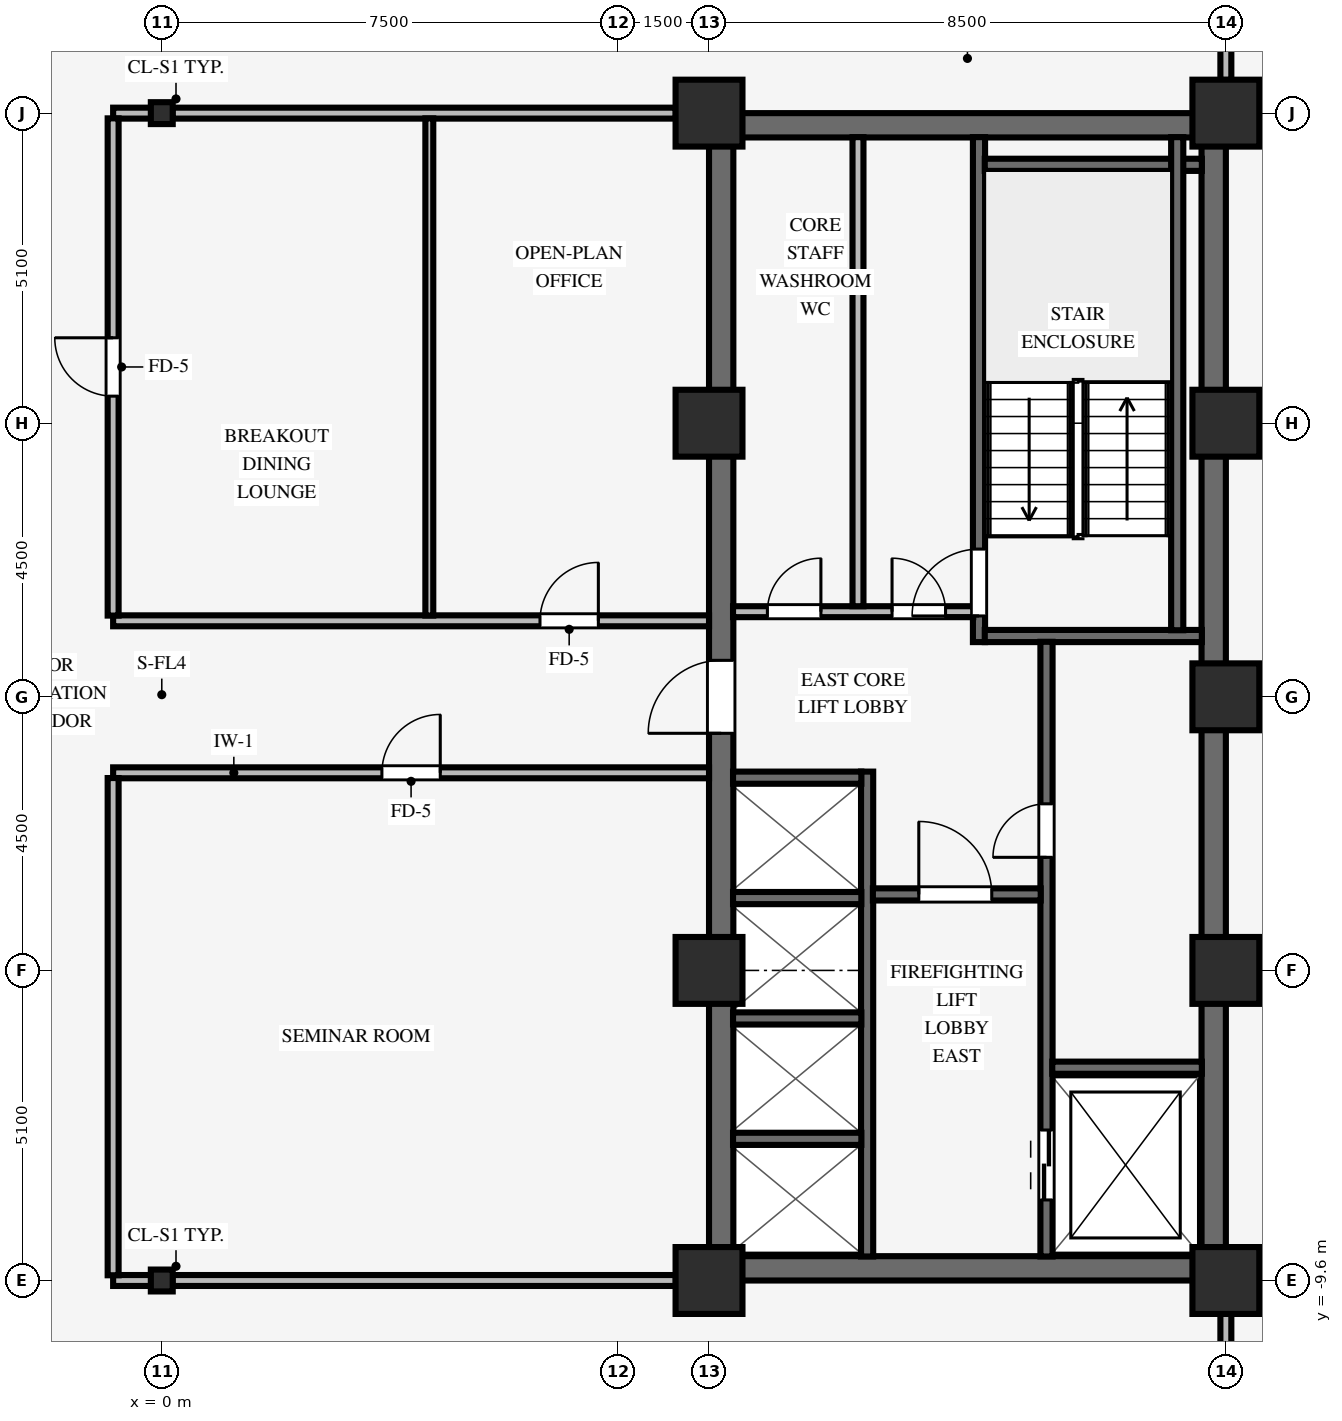
"""IFC4 building model, lengths in metres.
Left out: names, types, materials, properties, quantities, classifications, styles, units other than length and angle.
Written with IfcOpenShell. Run it as: python <this file> out.ifc"""

import sys

from ifc_helpers import new_model, si_unit, direction, frame, frame_2d, origin, origin_2d, place, context, subcontext, project, spatial, rectangle, i_section, extrude, source, transform, mapped, element, fill, save


model = new_model("IFC4")
c1 = context("Model", 3, precision=1e-05, world=origin(), true_north=direction((0.0, 1.0)))
c2 = subcontext(c1, "Body", "Model", "MODEL_VIEW")
j1 = project(units=[si_unit("LENGTHUNIT", "METRE"), si_unit("PLANEANGLEUNIT", "RADIAN")], contexts=[c1])
p1 = place(None, origin())
s1 = spatial("IfcSite", under=j1, at=p1, CompositionType="ELEMENT")
p2 = place(p1, origin())
s2 = spatial("IfcBuilding", under=s1, at=p2, CompositionType="ELEMENT")
p3 = place(p2, frame((0.0, 0.0, 98.3)))
s3 = spatial("IfcBuildingStorey", under=s2, at=p3, CompositionType="ELEMENT", Elevation=98.3)
for number, where, z_axis, x_axis in (
    (1, (9.0, -9.4, 0.0), (0.0, 0.0, 1.0), (1.0, 0.0, 0.0)),
    (2, (9.0, 9.4, 0.0), (0.0, 0.0, 1.0), (1.0, 0.0, 0.0)),
):
    element("IfcWall", number, at=place(p3, frame(where, z_axis=z_axis, x_axis=x_axis)), inside=s3, PredefinedType="SHEAR", context=c2, shape_type="SweptSolid", body=[
        extrude(rectangle(XDim=8.5, YDim=0.4, at=frame_2d((4.25, 0.0))), origin(), (0.0, 0.0, 1.0), 3.37),
    ])
p4 = place(p3, frame((9.2, -9.205, 0.0), z_axis=(0.0, 0.0, 1.0), x_axis=(0.0, 1.0, 0.0)))
e3 = element("IfcWall", 3, at=p4, inside=s3, PredefinedType="SHEAR", context=c2, shape_type="SweptSolid", body=[
    extrude(rectangle(XDim=18.41, YDim=0.4, at=frame_2d((9.205, 0.0))), origin(), (0.0, 0.0, 1.0), 3.37),
])
p5 = place(p4, frame((8.605, 0.0, 0.0)))
e4 = element("IfcOpeningElement", 4, at=p5, cuts=e3, PredefinedType="OPENING", context=c2, shape_type="SweptSolid", body=[
    extrude(rectangle(XDim=1.2, YDim=2.15, at=frame_2d((0.6, 1.075))), frame((0.0, 0.21, 0.0), z_axis=(0.0, -1.0, 0.0), x_axis=(1.0, 0.0, 0.0)), (0.0, 0.0, 1.0), 0.42),
])
p6 = place(p3, frame((17.3, -9.205, 0.0), z_axis=(0.0, 0.0, 1.0), x_axis=(0.0, 1.0, 0.0)))
e5 = element("IfcWall", 5, at=p6, inside=s3, PredefinedType="SHEAR", context=c2, shape_type="SweptSolid", body=[
    extrude(rectangle(XDim=18.41, YDim=0.4, at=frame_2d((9.205, 0.0))), origin(), (0.0, 0.0, 1.0), 3.37),
])
for number, where, z_axis, x_axis in (
    (6, (9.0, -9.6, 0.0), (0.0, 0.0, 1.0), (1.0, 0.0, 0.0)),
    (7, (9.0, -4.5, 0.0), (0.0, 0.0, 1.0), (1.0, 0.0, 0.0)),
    (8, (9.0, 4.5, 0.0), (0.0, 0.0, 1.0), (1.0, 0.0, 0.0)),
    (9, (9.0, 9.6, 0.0), (0.0, 0.0, 1.0), (1.0, 0.0, 0.0)),
    (10, (17.5, -9.6, 0.0), (0.0, 0.0, 1.0), (1.0, 0.0, 0.0)),
    (11, (17.5, -4.5, 0.0), (0.0, 0.0, 1.0), (1.0, 0.0, 0.0)),
    (12, (17.5, 4.5, 0.0), (0.0, 0.0, 1.0), (1.0, 0.0, 0.0)),
    (13, (17.5, 9.6, 0.0), (0.0, 0.0, 1.0), (1.0, 0.0, 0.0)),
    (14, (17.5, 0.0, 0.0), (0.0, 0.0, 1.0), (1.0, 0.0, 0.0)),
):
    element("IfcColumn", number, at=place(p3, frame(where, z_axis=z_axis, x_axis=x_axis)), inside=s3, PredefinedType="COLUMN", context=c2, shape_type="SweptSolid", body=[
        extrude(rectangle(XDim=1.1, YDim=1.1, at=origin_2d()), origin(), (0.0, 0.0, 1.0), 3.37),
    ])
for number, where, z_axis, x_axis in (
    (15, (0.0, -9.6, 0.0), (0.0, 0.0, 1.0), (1.0, 0.0, 0.0)),
    (16, (0.0, 9.6, 0.0), (0.0, 0.0, 1.0), (1.0, 0.0, 0.0)),
):
    element("IfcColumn", number, at=place(p3, frame(where, z_axis=z_axis, x_axis=x_axis)), inside=s3, PredefinedType="COLUMN", context=c2, shape_type="SweptSolid", body=[
        extrude(i_section(OverallWidth=0.36, OverallDepth=0.36, WebThickness=0.021, FlangeThickness=0.021, FilletRadius=0.018, at=origin_2d()), origin(), (0.0, 0.0, 1.0), 3.37),
    ])
p7 = place(p3, frame((13.44, 0.9, 0.0), z_axis=(0.0, 0.0, 1.0), x_axis=(0.0, 1.0, 0.0)))
e17 = element("IfcWall", 17, at=p7, inside=s3, PredefinedType="SHEAR", context=c2, shape_type="SweptSolid", body=[
    extrude(rectangle(XDim=8.305, YDim=0.2, at=frame_2d((4.153, 0.0))), origin(), (0.0, 0.0, 1.0), 3.37),
])
p8 = place(p7, frame((0.43, 0.0, 0.0)))
e18 = element("IfcOpeningElement", 18, at=p8, cuts=e17, PredefinedType="OPENING", context=c2, shape_type="SweptSolid", body=[
    extrude(rectangle(XDim=1.1, YDim=2.15, at=frame_2d((0.55, 1.075))), frame((0.0, 0.11, 0.0), z_axis=(0.0, -1.0, 0.0), x_axis=(1.0, 0.0, 0.0)), (0.0, 0.0, 1.0), 0.22),
])
for number, where, z_axis, x_axis in (
    (19, (13.535, 1.0, 0.0), (0.0, 0.0, 1.0), (1.0, 0.0, 0.0)),
    (20, (13.535, 8.75, 0.0), (0.0, 0.0, 1.0), (1.0, 0.0, 0.0)),
):
    element("IfcWall", number, at=place(p3, frame(where, z_axis=z_axis, x_axis=x_axis)), inside=s3, PredefinedType="SHEAR", context=c2, shape_type="SweptSolid", body=[
        extrude(rectangle(XDim=3.57, YDim=0.2, at=frame_2d((1.785, 0.0))), origin(), (0.0, 0.0, 1.0), 3.37),
    ])
p9 = place(p3, frame((16.7, 1.095, 0.0), z_axis=(0.0, 0.0, 1.0), x_axis=(0.0, 1.0, 0.0)))
e21 = element("IfcWall", 21, at=p9, inside=s3, PredefinedType="SHEAR", context=c2, shape_type="SweptSolid", body=[
    extrude(rectangle(XDim=8.11, YDim=0.2, at=frame_2d((4.055, 0.0))), origin(), (0.0, 0.0, 1.0), 3.37),
])
p10 = place(p3, frame((14.55, -9.205, 0.0), z_axis=(0.0, 0.0, 1.0), x_axis=(0.0, 1.0, 0.0)))
e22 = element("IfcWall", 22, at=p10, inside=s3, PredefinedType="SHEAR", context=c2, shape_type="SweptSolid", body=[
    extrude(rectangle(XDim=10.11, YDim=0.2, at=frame_2d((5.055, 0.0))), origin(), (0.0, 0.0, 1.0), 3.37),
])
p11 = place(p10, frame((6.565, 0.0, 0.0)))
e23 = element("IfcOpeningElement", 23, at=p11, cuts=e22, PredefinedType="OPENING", context=c2, shape_type="SweptSolid", body=[
    extrude(rectangle(XDim=0.88, YDim=2.1, at=frame_2d((0.44, 1.05))), frame((0.0, 0.11, 0.0), z_axis=(0.0, -1.0, 0.0), x_axis=(1.0, 0.0, 0.0)), (0.0, 0.0, 1.0), 0.22),
])
p12 = place(p10, frame((0.93, 0.0, 0.0)))
e24 = element("IfcOpeningElement", 24, at=p12, cuts=e22, PredefinedType="OPENING", context=c2, shape_type="SweptSolid", body=[
    extrude(rectangle(XDim=1.15, YDim=2.15, at=frame_2d((0.575, 1.075))), frame((0.0, 0.11, 0.0), z_axis=(0.0, -1.0, 0.0), x_axis=(1.0, 0.0, 0.0)), (0.0, 0.0, 1.0), 0.22),
])
p13 = place(p3, frame((14.645, -6.1, 0.0), z_axis=(0.0, 0.0, 1.0), x_axis=(1.0, 0.0, 0.0)))
e25 = element("IfcWall", 25, at=p13, inside=s3, PredefinedType="SHEAR", context=c2, shape_type="SweptSolid", body=[
    extrude(rectangle(XDim=2.46, YDim=0.2, at=frame_2d((1.23, 0.0))), origin(), (0.0, 0.0, 1.0), 3.37),
])
p14 = place(p3, frame((11.6, -9.205, 0.0), z_axis=(0.0, 0.0, 1.0), x_axis=(0.0, 1.0, 0.0)))
e26 = element("IfcWall", 26, at=p14, inside=s3, PredefinedType="SHEAR", context=c2, shape_type="SweptSolid", body=[
    extrude(rectangle(XDim=7.975, YDim=0.2, at=frame_2d((3.988, 0.0))), origin(), (0.0, 0.0, 1.0), 3.37),
])
p15 = place(p3, frame((11.695, -3.25, 0.0), z_axis=(0.0, 0.0, 1.0), x_axis=(1.0, 0.0, 0.0)))
e27 = element("IfcWall", 27, at=p15, inside=s3, PredefinedType="SHEAR", context=c2, shape_type="SweptSolid", body=[
    extrude(rectangle(XDim=2.76, YDim=0.2, at=frame_2d((1.38, 0.0))), origin(), (0.0, 0.0, 1.0), 3.37),
])
p16 = place(p15, frame((0.755, 0.0, 0.0)))
e28 = element("IfcOpeningElement", 28, at=p16, cuts=e27, PredefinedType="OPENING", context=c2, shape_type="SweptSolid", body=[
    extrude(rectangle(XDim=1.2, YDim=2.15, at=frame_2d((0.6, 1.075))), frame((0.0, 0.11, 0.0), z_axis=(0.0, -1.0, 0.0), x_axis=(1.0, 0.0, 0.0)), (0.0, 0.0, 1.0), 0.22),
])
for number, where, z_axis, x_axis in (
    (29, (9.395, -7.27, 0.0), (0.0, 0.0, 1.0), (1.0, 0.0, 0.0)),
    (30, (9.395, -5.29, 0.0), (0.0, 0.0, 1.0), (1.0, 0.0, 0.0)),
    (31, (9.395, -3.31, 0.0), (0.0, 0.0, 1.0), (1.0, 0.0, 0.0)),
    (32, (9.395, -1.33, 0.0), (0.0, 0.0, 1.0), (1.0, 0.0, 0.0)),
):
    element("IfcWall", number, at=place(p3, frame(where, z_axis=z_axis, x_axis=x_axis)), inside=s3, PredefinedType="SHEAR", context=c2, shape_type="SweptSolid", body=[
        extrude(rectangle(XDim=2.11, YDim=0.2, at=frame_2d((1.055, 0.0))), origin(), (0.0, 0.0, 1.0), 3.37),
    ])
p17 = place(p3, frame((9.395, 1.4, 0.0), z_axis=(0.0, 0.0, 1.0), x_axis=(1.0, 0.0, 0.0)))
e33 = element("IfcWall", 33, at=p17, inside=s3, PredefinedType="PARTITIONING", context=c2, shape_type="SweptSolid", body=[
    extrude(rectangle(XDim=3.95, YDim=0.18, at=frame_2d((1.975, 0.0))), origin(), (0.0, 0.0, 1.0), 3.36),
])
p18 = place(p17, frame((0.565, 0.0, 0.0)))
e34 = element("IfcOpeningElement", 34, at=p18, cuts=e33, PredefinedType="OPENING", context=c2, shape_type="SweptSolid", body=[
    extrude(rectangle(XDim=0.88, YDim=2.1, at=frame_2d((0.44, 1.05))), frame((0.0, 0.1, 0.0), z_axis=(0.0, -1.0, 0.0), x_axis=(1.0, 0.0, 0.0)), (0.0, 0.0, 1.0), 0.2),
])
p19 = place(p17, frame((2.615, 0.0, 0.0)))
e35 = element("IfcOpeningElement", 35, at=p19, cuts=e33, PredefinedType="OPENING", context=c2, shape_type="SweptSolid", body=[
    extrude(rectangle(XDim=0.88, YDim=2.1, at=frame_2d((0.44, 1.05))), frame((0.0, 0.1, 0.0), z_axis=(0.0, -1.0, 0.0), x_axis=(1.0, 0.0, 0.0)), (0.0, 0.0, 1.0), 0.2),
])
p20 = place(p3, frame((11.45, 1.49, 0.0), z_axis=(0.0, 0.0, 1.0), x_axis=(0.0, 1.0, 0.0)))
e36 = element("IfcWall", 36, at=p20, inside=s3, PredefinedType="PARTITIONING", context=c2, shape_type="SweptSolid", body=[
    extrude(rectangle(XDim=7.715, YDim=0.18, at=frame_2d((3.857, 0.0))), origin(), (0.0, 0.0, 1.0), 3.36),
])
p21 = place(p3, frame((-0.8, -9.6, 0.0), z_axis=(0.0, 0.0, 1.0), x_axis=(1.0, 0.0, 0.0)))
e37 = element("IfcWall", 37, at=p21, inside=s3, PredefinedType="PARTITIONING", context=c2, shape_type="SweptSolid", body=[
    extrude(rectangle(XDim=0.624, YDim=0.18, at=frame_2d((0.312, 0.0))), origin(), (0.0, 0.0, 1.0), 2.405),
])
p22 = place(p3, frame((0.176, -9.6, 0.0), z_axis=(0.0, 0.0, 1.0), x_axis=(1.0, 0.0, 0.0)))
e38 = element("IfcWall", 38, at=p22, inside=s3, PredefinedType="PARTITIONING", context=c2, shape_type="SweptSolid", body=[
    extrude(rectangle(XDim=8.278, YDim=0.18, at=frame_2d((4.139, 0.0))), origin(), (0.0, 0.0, 1.0), 2.405),
])
p23 = place(p3, frame((-0.8, -1.25, 0.0), z_axis=(0.0, 0.0, 1.0), x_axis=(1.0, 0.0, 0.0)))
e39 = element("IfcWall", 39, at=p23, inside=s3, PredefinedType="PARTITIONING", context=c2, shape_type="SweptSolid", body=[
    extrude(rectangle(XDim=9.8, YDim=0.18, at=frame_2d((4.9, 0.0))), origin(), (0.0, 0.0, 1.0), 3.36),
])
p24 = place(p23, frame((4.42, 0.0, 0.0)))
e40 = element("IfcOpeningElement", 40, at=p24, cuts=e39, PredefinedType="OPENING", context=c2, shape_type="SweptSolid", body=[
    extrude(rectangle(XDim=0.96, YDim=2.1, at=frame_2d((0.48, 1.05))), frame((0.0, 0.1, 0.0), z_axis=(0.0, -1.0, 0.0), x_axis=(1.0, 0.0, 0.0)), (0.0, 0.0, 1.0), 0.2),
])
p25 = place(p3, frame((-0.8, 1.25, 0.0), z_axis=(0.0, 0.0, 1.0), x_axis=(1.0, 0.0, 0.0)))
e41 = element("IfcWall", 41, at=p25, inside=s3, PredefinedType="PARTITIONING", context=c2, shape_type="SweptSolid", body=[
    extrude(rectangle(XDim=9.8, YDim=0.18, at=frame_2d((4.9, 0.0))), origin(), (0.0, 0.0, 1.0), 3.36),
])
p26 = place(p25, frame((7.02, 0.0, 0.0)))
e42 = element("IfcOpeningElement", 42, at=p26, cuts=e41, PredefinedType="OPENING", context=c2, shape_type="SweptSolid", body=[
    extrude(rectangle(XDim=0.96, YDim=2.1, at=frame_2d((0.48, 1.05))), frame((0.0, 0.1, 0.0), z_axis=(0.0, -1.0, 0.0), x_axis=(1.0, 0.0, 0.0)), (0.0, 0.0, 1.0), 0.2),
])
p27 = place(p3, frame((-0.8, 9.6, 0.0), z_axis=(0.0, 0.0, 1.0), x_axis=(1.0, 0.0, 0.0)))
e43 = element("IfcWall", 43, at=p27, inside=s3, PredefinedType="PARTITIONING", context=c2, shape_type="SweptSolid", body=[
    extrude(rectangle(XDim=0.624, YDim=0.18, at=frame_2d((0.312, 0.0))), origin(), (0.0, 0.0, 1.0), 2.405),
])
p28 = place(p3, frame((0.176, 9.6, 0.0), z_axis=(0.0, 0.0, 1.0), x_axis=(1.0, 0.0, 0.0)))
e44 = element("IfcWall", 44, at=p28, inside=s3, PredefinedType="PARTITIONING", context=c2, shape_type="SweptSolid", body=[
    extrude(rectangle(XDim=8.278, YDim=0.18, at=frame_2d((4.139, 0.0))), origin(), (0.0, 0.0, 1.0), 2.405),
])
p29 = place(p3, frame((-0.8, -9.514, 0.0), z_axis=(0.0, 0.0, 1.0), x_axis=(0.0, 1.0, 0.0)))
e45 = element("IfcWall", 45, at=p29, inside=s3, PredefinedType="PARTITIONING", context=c2, shape_type="SweptSolid", body=[
    extrude(rectangle(XDim=8.178, YDim=0.18, at=frame_2d((4.089, 0.0))), origin(), (0.0, 0.0, 1.0), 3.36),
])
p30 = place(p3, frame((-0.8, 1.336, 0.0), z_axis=(0.0, 0.0, 1.0), x_axis=(0.0, 1.0, 0.0)))
e46 = element("IfcWall", 46, at=p30, inside=s3, PredefinedType="PARTITIONING", context=c2, shape_type="SweptSolid", body=[
    extrude(rectangle(XDim=8.178, YDim=0.18, at=frame_2d((4.089, 0.0))), origin(), (0.0, 0.0, 1.0), 3.36),
])
p31 = place(p30, frame((3.609, 0.0, 0.0)))
e47 = element("IfcOpeningElement", 47, at=p31, cuts=e46, PredefinedType="OPENING", context=c2, shape_type="SweptSolid", body=[
    extrude(rectangle(XDim=0.96, YDim=2.1, at=frame_2d((0.48, 1.05))), frame((0.0, 0.1, 0.0), z_axis=(0.0, -1.0, 0.0), x_axis=(1.0, 0.0, 0.0)), (0.0, 0.0, 1.0), 0.2),
])
p32 = place(p3, frame((4.4, 1.336, 0.0), z_axis=(0.0, 0.0, 1.0), x_axis=(0.0, 1.0, 0.0)))
e48 = element("IfcWall", 48, at=p32, inside=s3, PredefinedType="PARTITIONING", context=c2, shape_type="SweptSolid", body=[
    extrude(rectangle(XDim=8.178, YDim=0.13, at=frame_2d((4.089, 0.0))), origin(), (0.0, 0.0, 1.0), 3.36),
])
for number, where, z_axis, x_axis in (
    (49, (17.5, -11.114, 0.0), (0.0, 0.0, 1.0), (0.0, 1.0, 0.0)),
    (50, (17.5, 10.146, 0.0), (0.0, 0.0, 1.0), (0.0, 1.0, 0.0)),
):
    element("IfcWall", number, at=place(p3, frame(where, z_axis=z_axis, x_axis=x_axis)), inside=s3, PredefinedType="PARTITIONING", context=c2, shape_type="SweptSolid", body=[
        extrude(rectangle(XDim=0.968, YDim=0.18, at=frame_2d((0.484, 0.0))), origin(), (0.0, 0.0, 1.0), 2.738),
    ])
m1 = source(origin(), c2, "Body", "SweptSolid", [
    extrude(rectangle(XDim=1.1, YDim=2.15, at=frame_2d((0.55, 1.075))), frame((0.0, 0.025, 0.0), z_axis=(0.0, -1.0, 0.0), x_axis=(1.0, 0.0, 0.0)), (0.0, 0.0, 1.0), 0.05),
])
p33 = place(p8, origin())
e51 = element("IfcDoor", 51, at=p33, inside=s3, OperationType="SINGLE_SWING_LEFT", PredefinedType="DOOR", context=c2, shape_type="MappedRepresentation", body=[
    mapped(m1, transform((0.0, 0.0, 0.0), scale=1.0)),
])
fill(e18, e51)
m2 = source(origin(), c2, "Body", "SweptSolid", [
    extrude(rectangle(XDim=0.88, YDim=2.1, at=frame_2d((0.44, 1.05))), frame((0.0, 0.025, 0.0), z_axis=(0.0, -1.0, 0.0), x_axis=(1.0, 0.0, 0.0)), (0.0, 0.0, 1.0), 0.05),
])
p34 = place(p11, origin())
e52 = element("IfcDoor", 52, at=p34, inside=s3, OperationType="SINGLE_SWING_LEFT", PredefinedType="DOOR", context=c2, shape_type="MappedRepresentation", body=[
    mapped(m2, transform((0.0, 0.0, 0.0), scale=1.0)),
])
fill(e23, e52)
m3 = source(origin(), c2, "Body", "SweptSolid", [
    extrude(rectangle(XDim=1.2, YDim=2.15, at=frame_2d((0.6, 1.075))), frame((0.0, 0.025, 0.0), z_axis=(0.0, -1.0, 0.0), x_axis=(1.0, 0.0, 0.0)), (0.0, 0.0, 1.0), 0.05),
])
p35 = place(p16, origin())
e53 = element("IfcDoor", 53, at=p35, inside=s3, OperationType="SINGLE_SWING_LEFT", PredefinedType="DOOR", context=c2, shape_type="MappedRepresentation", body=[
    mapped(m3, transform((0.0, 0.0, 0.0), scale=1.0)),
])
fill(e28, e53)
p36 = place(p5, origin())
e54 = element("IfcDoor", 54, at=p36, inside=s3, OperationType="SINGLE_SWING_LEFT", PredefinedType="DOOR", context=c2, shape_type="MappedRepresentation", body=[
    mapped(m3, transform((0.0, 0.0, 0.0), scale=1.0)),
])
fill(e4, e54)
p37 = place(p18, origin())
e55 = element("IfcDoor", 55, at=p37, inside=s3, OperationType="SINGLE_SWING_RIGHT", PredefinedType="DOOR", context=c2, shape_type="MappedRepresentation", body=[
    mapped(m2, transform((0.0, 0.0, 0.0), scale=1.0)),
])
fill(e34, e55)
p38 = place(p19, origin())
e56 = element("IfcDoor", 56, at=p38, inside=s3, OperationType="SINGLE_SWING_LEFT", PredefinedType="DOOR", context=c2, shape_type="MappedRepresentation", body=[
    mapped(m2, transform((0.0, 0.0, 0.0), scale=1.0)),
])
fill(e35, e56)
m4 = source(origin(), c2, "Body", "SweptSolid", [
    extrude(rectangle(XDim=1.15, YDim=2.15, at=frame_2d((0.575, 1.075))), frame((0.0, 0.025, 0.0), z_axis=(0.0, -1.0, 0.0), x_axis=(1.0, 0.0, 0.0)), (0.0, 0.0, 1.0), 0.05),
])
p39 = place(p12, origin())
e57 = element("IfcDoor", 57, at=p39, inside=s3, OperationType="DOUBLE_DOOR_SLIDING", PredefinedType="DOOR", context=c2, shape_type="MappedRepresentation", body=[
    mapped(m4, transform((0.0, 0.0, 0.0), scale=1.0)),
])
fill(e24, e57)
m5 = source(origin(), c2, "Body", "SweptSolid", [
    extrude(rectangle(XDim=0.96, YDim=2.1, at=frame_2d((0.48, 1.05))), frame((0.0, 0.025, 0.0), z_axis=(0.0, -1.0, 0.0), x_axis=(1.0, 0.0, 0.0)), (0.0, 0.0, 1.0), 0.05),
])
p40 = place(p24, origin())
e58 = element("IfcDoor", 58, at=p40, inside=s3, OperationType="SINGLE_SWING_RIGHT", PredefinedType="DOOR", context=c2, shape_type="MappedRepresentation", body=[
    mapped(m5, transform((0.0, 0.0, 0.0), scale=1.0)),
])
fill(e40, e58)
p41 = place(p31, origin())
e59 = element("IfcDoor", 59, at=p41, inside=s3, OperationType="SINGLE_SWING_RIGHT", PredefinedType="DOOR", context=c2, shape_type="MappedRepresentation", body=[
    mapped(m5, transform((0.0, 0.0, 0.0), scale=1.0)),
])
fill(e47, e59)
p42 = place(p26, origin())
e60 = element("IfcDoor", 60, at=p42, inside=s3, OperationType="SINGLE_SWING_RIGHT", PredefinedType="DOOR", context=c2, shape_type="MappedRepresentation", body=[
    mapped(m5, transform((0.0, 0.0, 0.0), scale=1.0)),
])
fill(e42, e60)
save(model, sys.argv[1])
